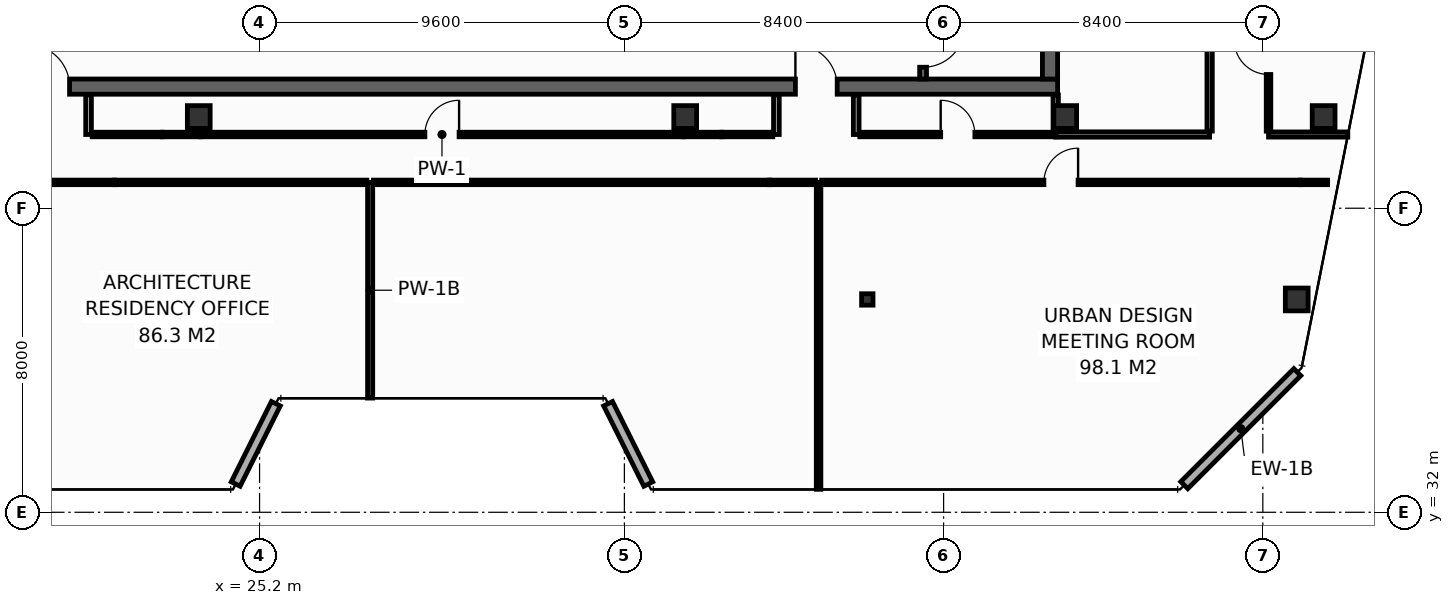
"""IFC4 building model, lengths in metres.
Left out: names, types, materials, properties, quantities, classifications, styles, units other than length and angle.
Written with IfcOpenShell. Run it as: python <this file> out.ifc"""

import sys

from ifc_helpers import new_model, si_unit, direction, frame, frame_2d, origin, origin_2d, place, context, subcontext, project, spatial, rectangle, hollow_rectangle, extrude, element, fill, save


model = new_model("IFC4")
c1 = context("Model", 3, precision=1e-05, world=origin(), true_north=direction((0.0, 1.0)))
c2 = subcontext(c1, "Body", "Model", "MODEL_VIEW")
j1 = project(units=[si_unit("LENGTHUNIT", "METRE"), si_unit("PLANEANGLEUNIT", "RADIAN")], contexts=[c1])
p1 = place(None, origin())
s1 = spatial("IfcSite", under=j1, at=p1, CompositionType="ELEMENT")
p2 = place(p1, origin())
s2 = spatial("IfcBuilding", under=s1, at=p2, CompositionType="ELEMENT")
p3 = place(p2, frame((0.0, 0.0, 306.6)))
s3 = spatial("IfcBuildingStorey", under=s2, at=p3, CompositionType="ELEMENT", Elevation=306.6)
p4 = place(p3, frame((13.7, 43.2, 0.0), z_axis=(0.0, 0.0, 1.0), x_axis=(1.0, 0.0, 0.0)))
e1 = element("IfcWall", 1, at=p4, inside=s3, PredefinedType="SHEAR", context=c2, shape_type="SweptSolid", body=[
    extrude(rectangle(XDim=32.5, YDim=0.4, at=frame_2d((16.25, 0.0))), origin(), (0.0, 0.0, 1.0), 3.55),
])
p5 = place(p4, frame((5.4, 0.0, 0.0)))
e2 = element("IfcOpeningElement", 2, at=p5, cuts=e1, PredefinedType="OPENING", context=c2, shape_type="SweptSolid", body=[
    extrude(rectangle(XDim=1.1, YDim=2.15, at=frame_2d((0.55, 1.075))), frame((0.0, 0.21, 0.0), z_axis=(0.0, -1.0, 0.0), x_axis=(1.0, 0.0, 0.0)), (0.0, 0.0, 1.0), 0.42),
])
p6 = place(p4, frame((25.6, 0.0, 0.0)))
e3 = element("IfcOpeningElement", 3, at=p6, cuts=e1, PredefinedType="OPENING", context=c2, shape_type="SweptSolid", body=[
    extrude(rectangle(XDim=1.1, YDim=2.15, at=frame_2d((0.55, 1.075))), frame((0.0, 0.21, 0.0), z_axis=(0.0, -1.0, 0.0), x_axis=(1.0, 0.0, 0.0)), (0.0, 0.0, 1.0), 0.42),
])
p7 = place(p3, frame((46.0, 43.4, 0.0), z_axis=(0.0, 0.0, 1.0), x_axis=(0.0, 1.0, 0.0)))
e4 = element("IfcWall", 4, at=p7, inside=s3, PredefinedType="SHEAR", context=c2, shape_type="SweptSolid", body=[
    extrude(rectangle(XDim=10.4, YDim=0.4, at=frame_2d((5.2, 0.0))), origin(), (0.0, 0.0, 1.0), 3.55),
])
for number, where, z_axis, x_axis in (
    (5, (23.6, 42.4, 0.0), (0.0, 0.0, 1.0), (1.0, 0.0, 0.0)),
    (6, (36.4, 42.4, 0.0), (0.0, 0.0, 1.0), (1.0, 0.0, 0.0)),
    (7, (46.4, 42.4, 0.0), (0.0, 0.0, 1.0), (1.0, 0.0, 0.0)),
    (8, (53.2, 42.4, 0.0), (0.0, 0.0, 1.0), (1.0, 0.0, 0.0)),
    (9, (52.492, 37.6, 0.0), (0.0, 0.0, 1.0), (1.0, 0.0, 0.0)),
):
    element("IfcColumn", number, at=place(p3, frame(where, z_axis=z_axis, x_axis=x_axis)), inside=s3, PredefinedType="COLUMN", context=c2, shape_type="SweptSolid", body=[
        extrude(hollow_rectangle(XDim=0.6, YDim=0.6, WallThickness=0.028, at=origin_2d()), origin(), (0.0, 0.0, 1.0), 3.8),
    ])
p8 = place(p3, frame((41.192, 37.6, 0.0), z_axis=(0.0, 0.0, 1.0), x_axis=(1.0, 0.0, 0.0)))
e10 = element("IfcColumn", 10, at=p8, inside=s3, PredefinedType="COLUMN", context=c2, shape_type="SweptSolid", body=[
    extrude(hollow_rectangle(XDim=0.3, YDim=0.3, WallThickness=0.012, at=origin_2d()), origin(), (0.0, 0.0, 1.0), 3.8),
])
p9 = place(p3, frame((42.66, 53.8, 0.0), z_axis=(0.0, 0.0, 1.0), x_axis=(0.0, -1.0, 0.0)))
e11 = element("IfcWall", 11, at=p9, inside=s3, PredefinedType="SHEAR", context=c2, shape_type="SweptSolid", body=[
    extrude(rectangle(XDim=10.4, YDim=0.18, at=frame_2d((5.2, 0.0))), origin(), (0.0, 0.0, 1.0), 3.55),
])
p10 = place(p9, frame((8.99, 0.0, 0.0)))
e12 = element("IfcOpeningElement", 12, at=p10, cuts=e11, PredefinedType="OPENING", context=c2, shape_type="SweptSolid", body=[
    extrude(rectangle(XDim=1.1, YDim=2.15, at=frame_2d((0.55, 1.075))), frame((0.0, 0.1, 0.0), z_axis=(0.0, -1.0, 0.0), x_axis=(1.0, 0.0, 0.0)), (0.0, 0.0, 1.0), 0.2),
])
for number, where, z_axis, x_axis in (
    (13, (24.572, 32.743, 0.0), (0.0, 0.0, 1.0), (0.447, 0.894, 0.0)),
    (14, (34.372, 34.857, 0.0), (0.0, 0.0, 1.0), (0.447, -0.894, 0.0)),
):
    element("IfcWall", number, at=place(p3, frame(where, z_axis=z_axis, x_axis=x_axis)), inside=s3, PredefinedType="STANDARD", context=c2, shape_type="SweptSolid", body=[
        extrude(rectangle(XDim=2.363, YDim=0.26, at=frame_2d((1.182, 0.0))), origin(), (0.0, 0.0, 1.0), 3.55),
    ])
p11 = place(p3, frame((49.533, 32.713, 0.0), z_axis=(0.0, 0.0, 1.0), x_axis=(0.70707775441, 0.707135806771, 0.0)))
e15 = element("IfcWall", 15, at=p11, inside=s3, PredefinedType="STANDARD", context=c2, shape_type="SweptSolid", body=[
    extrude(rectangle(XDim=4.206, YDim=0.26, at=frame_2d((2.103, 0.0))), origin(), (0.0, 0.0, 1.0), 3.55),
])
p12 = place(p3, frame((46.15, 41.94, 0.0), z_axis=(0.0, 0.0, 1.0), x_axis=(1.0, 0.0, 0.0)))
e16 = element("IfcWall", 16, at=p12, inside=s3, PredefinedType="PARTITIONING", context=c2, shape_type="SweptSolid", body=[
    extrude(rectangle(XDim=4.05, YDim=0.14, at=frame_2d((2.025, 0.0))), origin(), (0.0, 0.0, 1.0), 3.55),
])
p13 = place(p3, frame((46.15, 42.03, 0.0), z_axis=(0.0, 0.0, 1.0), x_axis=(0.0, 1.0, 0.0)))
e17 = element("IfcWall", 17, at=p13, inside=s3, PredefinedType="PARTITIONING", context=c2, shape_type="SweptSolid", body=[
    extrude(rectangle(XDim=0.95, YDim=0.14, at=frame_2d((0.475, 0.0))), origin(), (0.0, 0.0, 1.0), 3.55),
])
p14 = place(p3, frame((50.2, 42.03, 0.0), z_axis=(0.0, 0.0, 1.0), x_axis=(0.0, 1.0, 0.0)))
e18 = element("IfcWall", 18, at=p14, inside=s3, PredefinedType="PARTITIONING", context=c2, shape_type="SweptSolid", body=[
    extrude(rectangle(XDim=6.08, YDim=0.14, at=frame_2d((3.04, 0.0))), origin(), (0.0, 0.0, 1.0), 2.947),
])
p15 = place(p14, frame((2.59, 0.0, 0.0)))
e19 = element("IfcOpeningElement", 19, at=p15, cuts=e18, PredefinedType="OPENING", context=c2, shape_type="SweptSolid", body=[
    extrude(rectangle(XDim=0.9, YDim=2.1, at=frame_2d((0.45, 1.05))), frame((0.0, 0.08, 0.0), z_axis=(0.0, -1.0, 0.0), x_axis=(1.0, 0.0, 0.0)), (0.0, 0.0, 1.0), 0.16),
])
p16 = place(p3, frame((51.75, 41.94, 0.0), z_axis=(0.0, 0.0, 1.0), x_axis=(1.0, 0.0, 0.0)))
e20 = element("IfcWall", 20, at=p16, inside=s3, PredefinedType="PARTITIONING", context=c2, shape_type="SweptSolid", body=[
    extrude(rectangle(XDim=2.086, YDim=0.135, at=frame_2d((1.043, 0.0))), origin(), (0.0, 0.0, 1.0), 1.735),
])
p17 = place(p3, frame((51.75, 42.028, 0.0), z_axis=(0.0, 0.0, 1.0), x_axis=(0.0, 1.0, 0.0)))
e21 = element("IfcWall", 21, at=p17, inside=s3, PredefinedType="PARTITIONING", context=c2, shape_type="SweptSolid", body=[
    extrude(rectangle(XDim=3.885, YDim=0.12, at=frame_2d((1.942, 0.0))), origin(), (0.0, 0.0, 1.0), 2.947),
])
p18 = place(p17, frame((1.492, 0.0, 0.0)))
e22 = element("IfcOpeningElement", 22, at=p18, cuts=e21, PredefinedType="OPENING", context=c2, shape_type="SweptSolid", body=[
    extrude(rectangle(XDim=0.9, YDim=2.1, at=frame_2d((0.45, 1.05))), frame((0.0, 0.07, 0.0), z_axis=(0.0, -1.0, 0.0), x_axis=(1.0, 0.0, 0.0)), (0.0, 0.0, 1.0), 0.14),
])
for number, where, z_axis, x_axis in (
    (23, (20.7, 41.94, 0.0), (0.0, 0.0, 1.0), (0.0, 1.0, 0.0)),
    (24, (38.8, 41.94, 0.0), (0.0, 0.0, 1.0), (0.0, 1.0, 0.0)),
    (25, (40.9, 41.94, 0.0), (0.0, 0.0, 1.0), (0.0, 1.0, 0.0)),
):
    element("IfcWall", number, at=place(p3, frame(where, z_axis=z_axis, x_axis=x_axis)), inside=s3, PredefinedType="PARTITIONING", context=c2, shape_type="SweptSolid", body=[
        extrude(rectangle(XDim=1.04, YDim=0.15, at=frame_2d((0.52, 0.0))), origin(), (0.0, 0.0, 1.0), 3.55),
    ])
p19 = place(p3, frame((23.642, 41.94, 0.0), z_axis=(0.0, 0.0, 1.0), x_axis=(1.0, 0.0, 0.0)))
e26 = element("IfcWall", 26, at=p19, inside=s3, PredefinedType="PARTITIONING", context=c2, shape_type="SweptSolid", body=[
    extrude(rectangle(XDim=12.715, YDim=0.12, at=frame_2d((6.358, 0.0))), origin(), (0.0, 0.0, 1.0), 3.55),
])
p20 = place(p19, frame((5.908, 0.0, 0.0)))
e27 = element("IfcOpeningElement", 27, at=p20, cuts=e26, PredefinedType="OPENING", context=c2, shape_type="SweptSolid", body=[
    extrude(rectangle(XDim=0.9, YDim=2.1, at=frame_2d((0.45, 1.05))), frame((0.0, 0.07, 0.0), z_axis=(0.0, -1.0, 0.0), x_axis=(1.0, 0.0, 0.0)), (0.0, 0.0, 1.0), 0.14),
])
p21 = place(p3, frame((20.795, 41.94, 0.0), z_axis=(0.0, 0.0, 1.0), x_axis=(1.0, 0.0, 0.0)))
e28 = element("IfcWall", 28, at=p21, inside=s3, PredefinedType="PARTITIONING", context=c2, shape_type="SweptSolid", body=[
    extrude(rectangle(XDim=1.844, YDim=0.12, at=frame_2d((0.922, 0.0))), origin(), (0.0, 0.0, 1.0), 3.55),
])
p22 = place(p3, frame((37.361, 41.94, 0.0), z_axis=(0.0, 0.0, 1.0), x_axis=(1.0, 0.0, 0.0)))
e29 = element("IfcWall", 29, at=p22, inside=s3, PredefinedType="PARTITIONING", context=c2, shape_type="SweptSolid", body=[
    extrude(rectangle(XDim=1.344, YDim=0.12, at=frame_2d((0.672, 0.0))), origin(), (0.0, 0.0, 1.0), 3.55),
])
for number, where, z_axis, x_axis in (
    (30, (22.639, 41.94, 0.0), (0.0, 0.0, 1.0), (1.0, 0.0, 0.0)),
    (31, (36.358, 41.94, 0.0), (0.0, 0.0, 1.0), (1.0, 0.0, 0.0)),
):
    element("IfcWall", number, at=place(p3, frame(where, z_axis=z_axis, x_axis=x_axis)), inside=s3, PredefinedType="PARTITIONING", context=c2, shape_type="SweptSolid", body=[
        extrude(rectangle(XDim=1.003, YDim=0.12, at=frame_2d((0.501, 0.0))), origin(), (0.0, 0.0, 1.0), 1.735),
    ])
p23 = place(p3, frame((40.995, 41.94, 0.0), z_axis=(0.0, 0.0, 1.0), x_axis=(1.0, 0.0, 0.0)))
e32 = element("IfcWall", 32, at=p23, inside=s3, PredefinedType="PARTITIONING", context=c2, shape_type="SweptSolid", body=[
    extrude(rectangle(XDim=5.155, YDim=0.12, at=frame_2d((2.577, 0.0))), origin(), (0.0, 0.0, 1.0), 3.55),
])
p24 = place(p23, frame((2.128, 0.0, 0.0)))
e33 = element("IfcOpeningElement", 33, at=p24, cuts=e32, PredefinedType="OPENING", context=c2, shape_type="SweptSolid", body=[
    extrude(rectangle(XDim=0.9, YDim=2.1, at=frame_2d((0.45, 1.05))), frame((0.0, 0.07, 0.0), z_axis=(0.0, -1.0, 0.0), x_axis=(1.0, 0.0, 0.0)), (0.0, 0.0, 1.0), 0.14),
])
p25 = place(p3, frame((28.11, 35.005, 0.0), z_axis=(0.0, 0.0, 1.0), x_axis=(0.0, 1.0, 0.0)))
e34 = element("IfcWall", 34, at=p25, inside=s3, PredefinedType="PARTITIONING", context=c2, shape_type="SweptSolid", body=[
    extrude(rectangle(XDim=5.675, YDim=0.135, at=frame_2d((2.837, 0.0))), origin(), (0.0, 0.0, 1.0), 2.135),
])
p26 = place(p3, frame((39.91, 32.605, 0.0), z_axis=(0.0, 0.0, 1.0), x_axis=(0.0, 1.0, 0.0)))
e35 = element("IfcWall", 35, at=p26, inside=s3, PredefinedType="PARTITIONING", context=c2, shape_type="SweptSolid", body=[
    extrude(rectangle(XDim=8.075, YDim=0.12, at=frame_2d((4.038, 0.0))), origin(), (0.0, 0.0, 1.0), 1.735),
])
p27 = place(p3, frame((16.4, 40.68, 0.0), z_axis=(0.0, 0.0, 1.0), x_axis=(1.0, 0.0, 0.0)))
e36 = element("IfcWall", 36, at=p27, inside=s3, PredefinedType="PARTITIONING", context=c2, shape_type="SweptSolid", body=[
    extrude(rectangle(XDim=4.981, YDim=0.12, at=frame_2d((2.491, 0.0))), origin(), (0.0, 0.0, 1.0), 3.55),
])
p28 = place(p27, frame((2.041, 0.0, 0.0)))
e37 = element("IfcOpeningElement", 37, at=p28, cuts=e36, PredefinedType="OPENING", context=c2, shape_type="SweptSolid", body=[
    extrude(rectangle(XDim=0.9, YDim=2.1, at=frame_2d((0.45, 1.05))), frame((0.0, 0.07, 0.0), z_axis=(0.0, -1.0, 0.0), x_axis=(1.0, 0.0, 0.0)), (0.0, 0.0, 1.0), 0.14),
])
p29 = place(p3, frame((21.381, 40.68, 0.0), z_axis=(0.0, 0.0, 1.0), x_axis=(1.0, 0.0, 0.0)))
e38 = element("IfcWall", 38, at=p29, inside=s3, PredefinedType="PARTITIONING", context=c2, shape_type="SweptSolid", body=[
    extrude(rectangle(XDim=6.641, YDim=0.12, at=frame_2d((3.321, 0.0))), origin(), (0.0, 0.0, 1.0), 1.735),
])
p30 = place(p3, frame((38.619, 40.68, 0.0), z_axis=(0.0, 0.0, 1.0), x_axis=(1.0, 0.0, 0.0)))
e39 = element("IfcWall", 39, at=p30, inside=s3, PredefinedType="PARTITIONING", context=c2, shape_type="SweptSolid", body=[
    extrude(rectangle(XDim=1.211, YDim=0.12, at=frame_2d((0.605, 0.0))), origin(), (0.0, 0.0, 1.0), 3.55),
])
p31 = place(p3, frame((28.198, 40.68, 0.0), z_axis=(0.0, 0.0, 1.0), x_axis=(1.0, 0.0, 0.0)))
e40 = element("IfcWall", 40, at=p31, inside=s3, PredefinedType="PARTITIONING", context=c2, shape_type="SweptSolid", body=[
    extrude(rectangle(XDim=10.421, YDim=0.12, at=frame_2d((5.211, 0.0))), origin(), (0.0, 0.0, 1.0), 1.735),
])
p32 = place(p3, frame((39.99, 40.68, 0.0), z_axis=(0.0, 0.0, 1.0), x_axis=(1.0, 0.0, 0.0)))
e41 = element("IfcWall", 41, at=p32, inside=s3, PredefinedType="PARTITIONING", context=c2, shape_type="SweptSolid", body=[
    extrude(rectangle(XDim=12.597, YDim=0.12, at=frame_2d((6.299, 0.0))), origin(), (0.0, 0.0, 1.0), 3.55),
])
p33 = place(p32, frame((5.849, 0.0, 0.0)))
e42 = element("IfcOpeningElement", 42, at=p33, cuts=e41, PredefinedType="OPENING", context=c2, shape_type="SweptSolid", body=[
    extrude(rectangle(XDim=0.9, YDim=2.1, at=frame_2d((0.45, 1.05))), frame((0.0, 0.07, 0.0), z_axis=(0.0, -1.0, 0.0), x_axis=(1.0, 0.0, 0.0)), (0.0, 0.0, 1.0), 0.14),
])
p34 = place(p3, frame((52.587, 40.68, 0.0), z_axis=(0.0, 0.0, 1.0), x_axis=(1.0, 0.0, 0.0)))
e43 = element("IfcWall", 43, at=p34, inside=s3, PredefinedType="PARTITIONING", context=c2, shape_type="SweptSolid", body=[
    extrude(rectangle(XDim=0.718, YDim=0.12, at=frame_2d((0.359, 0.0))), origin(), (0.0, 0.0, 1.0), 1.735),
])
p35 = place(p10, origin())
e44 = element("IfcDoor", 44, at=p35, inside=s3, OperationType="SINGLE_SWING_LEFT", PredefinedType="DOOR", context=c2, shape_type="SweptSolid", body=[
    extrude(rectangle(XDim=1.1, YDim=2.15, at=frame_2d((0.55, 1.075))), frame((0.0, 0.025, 0.0), z_axis=(0.0, -1.0, 0.0), x_axis=(1.0, 0.0, 0.0)), (0.0, 0.0, 1.0), 0.05),
])
fill(e12, e44)
p36 = place(p5, origin())
e45 = element("IfcDoor", 45, at=p36, inside=s3, OperationType="SINGLE_SWING_LEFT", PredefinedType="DOOR", context=c2, shape_type="SweptSolid", body=[
    extrude(rectangle(XDim=1.1, YDim=2.15, at=frame_2d((0.55, 1.075))), frame((0.0, 0.025, 0.0), z_axis=(0.0, -1.0, 0.0), x_axis=(1.0, 0.0, 0.0)), (0.0, 0.0, 1.0), 0.05),
])
fill(e2, e45)
p37 = place(p6, origin())
e46 = element("IfcDoor", 46, at=p37, inside=s3, OperationType="SINGLE_SWING_LEFT", PredefinedType="DOOR", context=c2, shape_type="SweptSolid", body=[
    extrude(rectangle(XDim=1.1, YDim=2.15, at=frame_2d((0.55, 1.075))), frame((0.0, 0.025, 0.0), z_axis=(0.0, -1.0, 0.0), x_axis=(1.0, 0.0, 0.0)), (0.0, 0.0, 1.0), 0.05),
])
fill(e3, e46)
p38 = place(p18, origin())
e47 = element("IfcDoor", 47, at=p38, inside=s3, OperationType="SINGLE_SWING_RIGHT", PredefinedType="DOOR", context=c2, shape_type="SweptSolid", body=[
    extrude(rectangle(XDim=0.9, YDim=2.1, at=frame_2d((0.45, 1.05))), frame((0.0, 0.025, 0.0), z_axis=(0.0, -1.0, 0.0), x_axis=(1.0, 0.0, 0.0)), (0.0, 0.0, 1.0), 0.05),
])
fill(e22, e47)
p39 = place(p20, origin())
e48 = element("IfcDoor", 48, at=p39, inside=s3, OperationType="SINGLE_SWING_RIGHT", PredefinedType="DOOR", context=c2, shape_type="SweptSolid", body=[
    extrude(rectangle(XDim=0.9, YDim=2.1, at=frame_2d((0.45, 1.05))), frame((0.0, 0.025, 0.0), z_axis=(0.0, -1.0, 0.0), x_axis=(1.0, 0.0, 0.0)), (0.0, 0.0, 1.0), 0.05),
])
fill(e27, e48)
p40 = place(p24, origin())
e49 = element("IfcDoor", 49, at=p40, inside=s3, OperationType="SINGLE_SWING_LEFT", PredefinedType="DOOR", context=c2, shape_type="SweptSolid", body=[
    extrude(rectangle(XDim=0.9, YDim=2.1, at=frame_2d((0.45, 1.05))), frame((0.0, 0.025, 0.0), z_axis=(0.0, -1.0, 0.0), x_axis=(1.0, 0.0, 0.0)), (0.0, 0.0, 1.0), 0.05),
])
fill(e33, e49)
p41 = place(p33, origin())
e50 = element("IfcDoor", 50, at=p41, inside=s3, OperationType="SINGLE_SWING_RIGHT", PredefinedType="DOOR", context=c2, shape_type="SweptSolid", body=[
    extrude(rectangle(XDim=0.9, YDim=2.1, at=frame_2d((0.45, 1.05))), frame((0.0, 0.025, 0.0), z_axis=(0.0, -1.0, 0.0), x_axis=(1.0, 0.0, 0.0)), (0.0, 0.0, 1.0), 0.05),
])
fill(e42, e50)
save(model, sys.argv[1])
